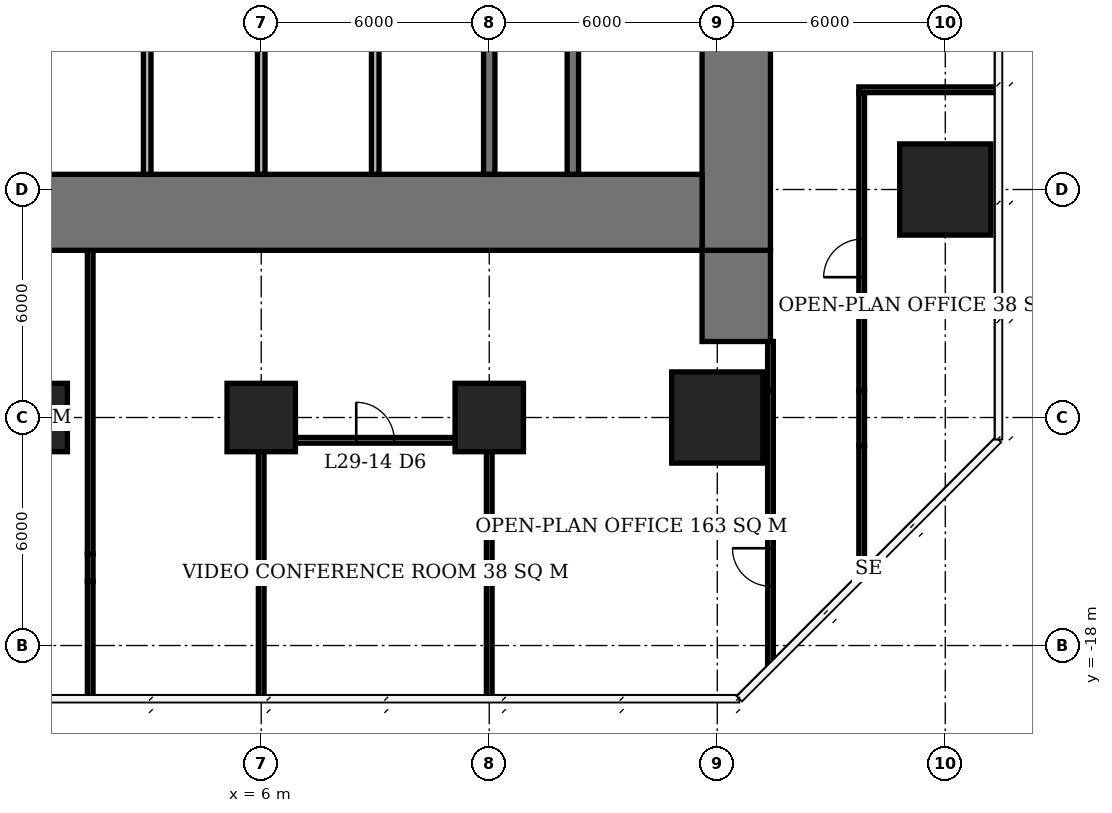
"""IFC4 building model, lengths in metres.
Left out: names, types, materials, properties, quantities, classifications, styles, units other than length and angle.
Written with IfcOpenShell. Run it as: python <this file> out.ifc"""

import sys

from ifc_helpers import new_model, si_unit, direction, frame, frame_2d, origin, origin_2d, place, context, subcontext, project, spatial, rectangle, extrude, element, fill, save


model = new_model("IFC4")
c1 = context("Model", 3, precision=1e-05, world=origin(), true_north=direction((0.0, 1.0)))
c2 = subcontext(c1, "Body", "Model", "MODEL_VIEW")
j1 = project(units=[si_unit("LENGTHUNIT", "METRE"), si_unit("PLANEANGLEUNIT", "RADIAN")], contexts=[c1])
p1 = place(None, origin())
s1 = spatial("IfcSite", under=j1, at=p1, CompositionType="ELEMENT")
p2 = place(p1, origin())
s2 = spatial("IfcBuilding", under=s1, at=p2, CompositionType="ELEMENT")
p3 = place(p2, frame((0.0, 0.0, 121.1)))
s3 = spatial("IfcBuildingStorey", under=s2, at=p3, CompositionType="ELEMENT", Elevation=121.1)
for number, where, z_axis, x_axis in (
    (1, (0.0, -12.0, 0.0), (0.0, 0.0, 1.0), (1.0, 0.0, 0.0)),
    (2, (6.0, -12.0, 0.0), (0.0, 0.0, 1.0), (1.0, 0.0, 0.0)),
    (3, (12.0, -12.0, 0.0), (0.0, 0.0, 1.0), (1.0, 0.0, 0.0)),
):
    element("IfcColumn", number, at=place(p3, frame(where, z_axis=z_axis, x_axis=x_axis)), inside=s3, PredefinedType="COLUMN", context=c2, shape_type="SweptSolid", body=[
        extrude(rectangle(XDim=1.8, YDim=1.8, at=origin_2d()), origin(), (0.0, 0.0, 1.0), 3.9),
    ])
for number, where, z_axis, x_axis in (
    (4, (18.0, -12.0, 0.0), (0.0, 0.0, 1.0), (1.0, 0.0, 0.0)),
    (5, (24.0, -6.0, 0.0), (0.0, 0.0, 1.0), (1.0, 0.0, 0.0)),
):
    element("IfcColumn", number, at=place(p3, frame(where, z_axis=z_axis, x_axis=x_axis)), inside=s3, PredefinedType="COLUMN", context=c2, shape_type="SweptSolid", body=[
        extrude(rectangle(XDim=2.4, YDim=2.4, at=origin_2d()), origin(), (0.0, 0.0, 1.0), 3.9),
    ])
p4 = place(p3, frame((-5.6, -6.6, 0.0), z_axis=(0.0, 0.0, 1.0), x_axis=(1.0, 0.0, 0.0)))
e6 = element("IfcWall", 6, at=p4, inside=s3, PredefinedType="SHEAR", context=c2, shape_type="SweptSolid", body=[
    extrude(rectangle(XDim=23.2, YDim=2.0, at=frame_2d((11.6, 0.0))), origin(), (0.0, 0.0, 1.0), 3.9),
])
p5 = place(p3, frame((18.5, -7.6, 0.0), z_axis=(0.0, 0.0, 1.0), x_axis=(0.0, 1.0, 0.0)))
e7 = element("IfcWall", 7, at=p5, inside=s3, PredefinedType="SHEAR", context=c2, shape_type="SweptSolid", body=[
    extrude(rectangle(XDim=21.2, YDim=1.8, at=frame_2d((10.6, 0.0))), origin(), (0.0, 0.0, 1.0), 3.9),
])
p6 = place(p5, frame((9.2, 0.0, 0.0)))
e8 = element("IfcOpeningElement", 8, at=p6, cuts=e7, PredefinedType="OPENING", context=c2, shape_type="SweptSolid", body=[
    extrude(rectangle(XDim=1.8, YDim=2.4, at=frame_2d((0.9, 1.2))), frame((0.0, 0.91, 0.0), z_axis=(0.0, -1.0, 0.0), x_axis=(1.0, 0.0, 0.0)), (0.0, 0.0, 1.0), 1.82),
])
p7 = place(p3, frame((18.5, -10.0, 0.0), z_axis=(0.0, 0.0, 1.0), x_axis=(0.0, 1.0, 0.0)))
e9 = element("IfcWall", 9, at=p7, inside=s3, PredefinedType="SHEAR", context=c2, shape_type="SweptSolid", body=[
    extrude(rectangle(XDim=2.4, YDim=1.8, at=frame_2d((1.2, 0.0))), origin(), (0.0, 0.0, 1.0), 3.9),
])
p8 = place(p3, frame((12.0, -5.6, 0.0), z_axis=(0.0, 0.0, 1.0), x_axis=(0.0, 1.0, 0.0)))
e10 = element("IfcWall", 10, at=p8, inside=s3, PredefinedType="SHEAR", context=c2, shape_type="SweptSolid", body=[
    extrude(rectangle(XDim=5.45, YDim=0.3, at=frame_2d((2.725, 0.0))), origin(), (0.0, 0.0, 1.0), 3.9),
])
p9 = place(p3, frame((14.2, -5.6, 0.0), z_axis=(0.0, 0.0, 1.0), x_axis=(0.0, 1.0, 0.0)))
e11 = element("IfcWall", 11, at=p9, inside=s3, PredefinedType="SHEAR", context=c2, shape_type="SweptSolid", body=[
    extrude(rectangle(XDim=8.45, YDim=0.3, at=frame_2d((4.225, 0.0))), origin(), (0.0, 0.0, 1.0), 3.9),
])
for number, where, z_axis, x_axis in (
    (12, (3.0, -5.6, 0.0), (0.0, 0.0, 1.0), (0.0, 1.0, 0.0)),
    (13, (6.0, -5.6, 0.0), (0.0, 0.0, 1.0), (0.0, 1.0, 0.0)),
    (14, (9.0, -5.6, 0.0), (0.0, 0.0, 1.0), (0.0, 1.0, 0.0)),
):
    element("IfcWall", number, at=place(p3, frame(where, z_axis=z_axis, x_axis=x_axis)), inside=s3, PredefinedType="SOLIDWALL", context=c2, shape_type="SweptSolid", body=[
        extrude(rectangle(XDim=5.45, YDim=0.2, at=frame_2d((2.725, 0.0))), origin(), (0.0, 0.0, 1.0), 3.9),
    ])
p10 = place(p3, frame((6.9, -12.6, 0.0), z_axis=(0.0, 0.0, 1.0), x_axis=(1.0, 0.0, 0.0)))
e15 = element("IfcWall", 15, at=p10, inside=s3, PredefinedType="PARTITIONING", context=c2, shape_type="SweptSolid", body=[
    extrude(rectangle(XDim=4.2, YDim=0.15, at=frame_2d((2.1, 0.0))), origin(), (0.0, 0.0, 1.0), 3.65),
])
p11 = place(p10, frame((1.6, 0.0, 0.0)))
e16 = element("IfcOpeningElement", 16, at=p11, cuts=e15, PredefinedType="OPENING", context=c2, shape_type="SweptSolid", body=[
    extrude(rectangle(XDim=1.0, YDim=2.1, at=frame_2d((0.5, 1.05))), frame((0.0, 0.085, 0.0), z_axis=(0.0, -1.0, 0.0), x_axis=(1.0, 0.0, 0.0)), (0.0, 0.0, 1.0), 0.17),
])
p12 = place(p3, frame((6.0, -19.4, 0.0), z_axis=(0.0, 0.0, 1.0), x_axis=(0.0, 1.0, 0.0)))
e17 = element("IfcWall", 17, at=p12, inside=s3, PredefinedType="PARTITIONING", context=c2, shape_type="SweptSolid", body=[
    extrude(rectangle(XDim=3.09, YDim=0.15, at=frame_2d((1.545, 0.0))), origin(), (0.0, 0.0, 1.0), 3.65),
])
p13 = place(p3, frame((6.0, -16.31, 0.0), z_axis=(0.0, 0.0, 1.0), x_axis=(0.0, 1.0, 0.0)))
e18 = element("IfcWall", 18, at=p13, inside=s3, PredefinedType="PARTITIONING", context=c2, shape_type="SweptSolid", body=[
    extrude(rectangle(XDim=3.41, YDim=0.15, at=frame_2d((1.705, 0.0))), origin(), (0.0, 0.0, 1.0), 2.65),
])
p14 = place(p3, frame((12.0, -19.4, 0.0), z_axis=(0.0, 0.0, 1.0), x_axis=(0.0, 1.0, 0.0)))
e19 = element("IfcWall", 19, at=p14, inside=s3, PredefinedType="PARTITIONING", context=c2, shape_type="SweptSolid", body=[
    extrude(rectangle(XDim=3.09, YDim=0.15, at=frame_2d((1.545, 0.0))), origin(), (0.0, 0.0, 1.0), 3.65),
])
p15 = place(p3, frame((12.0, -16.31, 0.0), z_axis=(0.0, 0.0, 1.0), x_axis=(0.0, 1.0, 0.0)))
e20 = element("IfcWall", 20, at=p15, inside=s3, PredefinedType="PARTITIONING", context=c2, shape_type="SweptSolid", body=[
    extrude(rectangle(XDim=3.41, YDim=0.15, at=frame_2d((1.705, 0.0))), origin(), (0.0, 0.0, 1.0), 2.65),
])
p16 = place(p3, frame((1.5, -19.4, 0.0), z_axis=(0.0, 0.0, 1.0), x_axis=(0.0, 1.0, 0.0)))
e21 = element("IfcWall", 21, at=p16, inside=s3, PredefinedType="PARTITIONING", context=c2, shape_type="SweptSolid", body=[
    extrude(rectangle(XDim=3.09, YDim=0.15, at=frame_2d((1.545, 0.0))), origin(), (0.0, 0.0, 1.0), 3.65),
])
p17 = place(p3, frame((1.5, -16.31, 0.0), z_axis=(0.0, 0.0, 1.0), x_axis=(0.0, 1.0, 0.0)))
e22 = element("IfcWall", 22, at=p17, inside=s3, PredefinedType="PARTITIONING", context=c2, shape_type="SweptSolid", body=[
    extrude(rectangle(XDim=0.72, YDim=0.15, at=frame_2d((0.36, 0.0))), origin(), (0.0, 0.0, 1.0), 2.65),
])
p18 = place(p3, frame((1.5, -15.59, 0.0), z_axis=(0.0, 0.0, 1.0), x_axis=(0.0, 1.0, 0.0)))
e23 = element("IfcWall", 23, at=p18, inside=s3, PredefinedType="PARTITIONING", context=c2, shape_type="SweptSolid", body=[
    extrude(rectangle(XDim=7.99, YDim=0.15, at=frame_2d((3.995, 0.0))), origin(), (0.0, 0.0, 1.0), 3.65),
])
p19 = place(p3, frame((19.4, -18.489, 0.0), z_axis=(0.0, 0.0, 1.0), x_axis=(0.0, 1.0, 0.0)))
e24 = element("IfcWall", 24, at=p19, inside=s3, PredefinedType="PARTITIONING", context=c2, shape_type="SweptSolid", body=[
    extrude(rectangle(XDim=3.349, YDim=0.15, at=frame_2d((1.675, 0.0))), origin(), (0.0, 0.0, 1.0), 3.65),
])
p20 = place(p19, frame((2.049, 0.0, 0.0)))
e25 = element("IfcOpeningElement", 25, at=p20, cuts=e24, PredefinedType="OPENING", context=c2, shape_type="SweptSolid", body=[
    extrude(rectangle(XDim=1.0, YDim=2.1, at=frame_2d((0.5, 1.05))), frame((0.0, 0.085, 0.0), z_axis=(0.0, -1.0, 0.0), x_axis=(1.0, 0.0, 0.0)), (0.0, 0.0, 1.0), 0.17),
])
p21 = place(p3, frame((19.4, -15.14, 0.0), z_axis=(0.0, 0.0, 1.0), x_axis=(0.0, 1.0, 0.0)))
e26 = element("IfcWall", 26, at=p21, inside=s3, PredefinedType="PARTITIONING", context=c2, shape_type="SweptSolid", body=[
    extrude(rectangle(XDim=3.85, YDim=0.15, at=frame_2d((1.925, 0.0))), origin(), (0.0, 0.0, 1.0), 2.65),
])
p22 = place(p3, frame((19.4, -11.29, 0.0), z_axis=(0.0, 0.0, 1.0), x_axis=(0.0, 1.0, 0.0)))
e27 = element("IfcWall", 27, at=p22, inside=s3, PredefinedType="PARTITIONING", context=c2, shape_type="SweptSolid", body=[
    extrude(rectangle(XDim=1.29, YDim=0.15, at=frame_2d((0.645, 0.0))), origin(), (0.0, 0.0, 1.0), 3.65),
])
p23 = place(p3, frame((21.8, -16.089, 0.0), z_axis=(0.0, 0.0, 1.0), x_axis=(0.0, 1.0, 0.0)))
e28 = element("IfcWall", 28, at=p23, inside=s3, PredefinedType="PARTITIONING", context=c2, shape_type="SweptSolid", body=[
    extrude(rectangle(XDim=3.349, YDim=0.15, at=frame_2d((1.675, 0.0))), origin(), (0.0, 0.0, 1.0), 3.65),
])
p24 = place(p3, frame((21.8, -12.74, 0.0), z_axis=(0.0, 0.0, 1.0), x_axis=(0.0, 1.0, 0.0)))
e29 = element("IfcWall", 29, at=p24, inside=s3, PredefinedType="PARTITIONING", context=c2, shape_type="SweptSolid", body=[
    extrude(rectangle(XDim=1.45, YDim=0.15, at=frame_2d((0.725, 0.0))), origin(), (0.0, 0.0, 1.0), 2.65),
])
p25 = place(p3, frame((21.8, -11.29, 0.0), z_axis=(0.0, 0.0, 1.0), x_axis=(0.0, 1.0, 0.0)))
e30 = element("IfcWall", 30, at=p25, inside=s3, PredefinedType="PARTITIONING", context=c2, shape_type="SweptSolid", body=[
    extrude(rectangle(XDim=7.84, YDim=0.15, at=frame_2d((3.92, 0.0))), origin(), (0.0, 0.0, 1.0), 3.65),
])
p26 = place(p25, frame((2.983, 0.0, 0.0)))
e31 = element("IfcOpeningElement", 31, at=p26, cuts=e30, PredefinedType="OPENING", context=c2, shape_type="SweptSolid", body=[
    extrude(rectangle(XDim=1.0, YDim=2.1, at=frame_2d((0.5, 1.05))), frame((0.0, 0.085, 0.0), z_axis=(0.0, -1.0, 0.0), x_axis=(1.0, 0.0, 0.0)), (0.0, 0.0, 1.0), 0.17),
])
p27 = place(p3, frame((21.725, -3.375, 0.0), z_axis=(0.0, 0.0, 1.0), x_axis=(1.0, 0.0, 0.0)))
e32 = element("IfcWall", 32, at=p27, inside=s3, PredefinedType="PARTITIONING", context=c2, shape_type="SweptSolid", body=[
    extrude(rectangle(XDim=3.625, YDim=0.15, at=frame_2d((1.812, 0.0))), origin(), (0.0, 0.0, 1.0), 3.65),
])
p28 = place(p11, origin())
e33 = element("IfcDoor", 33, at=p28, inside=s3, OperationType="SINGLE_SWING_LEFT", PredefinedType="DOOR", context=c2, shape_type="SweptSolid", body=[
    extrude(rectangle(XDim=1.0, YDim=2.1, at=frame_2d((0.5, 1.05))), frame((0.0, 0.025, 0.0), z_axis=(0.0, -1.0, 0.0), x_axis=(1.0, 0.0, 0.0)), (0.0, 0.0, 1.0), 0.05),
])
fill(e16, e33)
p29 = place(p20, origin())
e34 = element("IfcDoor", 34, at=p29, inside=s3, OperationType="SINGLE_SWING_RIGHT", PredefinedType="DOOR", context=c2, shape_type="SweptSolid", body=[
    extrude(rectangle(XDim=1.0, YDim=2.1, at=frame_2d((0.5, 1.05))), frame((0.0, 0.025, 0.0), z_axis=(0.0, -1.0, 0.0), x_axis=(1.0, 0.0, 0.0)), (0.0, 0.0, 1.0), 0.05),
])
fill(e25, e34)
p30 = place(p26, origin())
e35 = element("IfcDoor", 35, at=p30, inside=s3, OperationType="SINGLE_SWING_LEFT", PredefinedType="DOOR", context=c2, shape_type="SweptSolid", body=[
    extrude(rectangle(XDim=1.0, YDim=2.1, at=frame_2d((0.5, 1.05))), frame((0.0, 0.025, 0.0), z_axis=(0.0, -1.0, 0.0), x_axis=(1.0, 0.0, 0.0)), (0.0, 0.0, 1.0), 0.05),
])
fill(e31, e35)
save(model, sys.argv[1])
